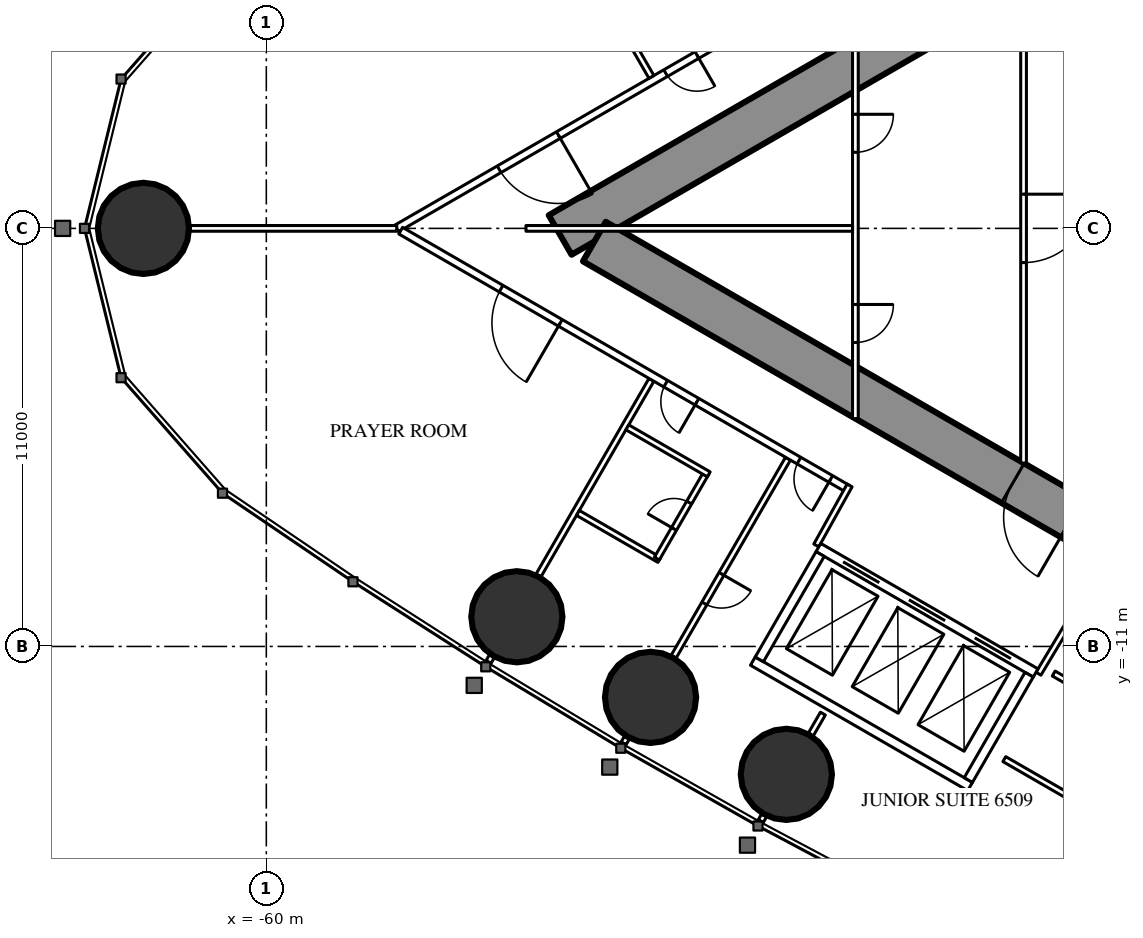
"""IFC4 building model, lengths in metres.
Left out: names, types, materials, properties, quantities, classifications, styles, units other than length and angle.
Written with IfcOpenShell. Run it as: python <this file> out.ifc"""

import sys

from ifc_helpers import new_model, si_unit, direction, frame, frame_2d, origin, origin_2d, place, context, subcontext, project, spatial, rectangle, circle, extrude, element, fill, save


model = new_model("IFC4")
c1 = context("Model", 3, precision=1e-05, world=origin(), true_north=direction((0.0, 1.0)))
c2 = subcontext(c1, "Body", "Model", "MODEL_VIEW")
j1 = project(units=[si_unit("LENGTHUNIT", "METRE"), si_unit("PLANEANGLEUNIT", "RADIAN")], contexts=[c1])
p1 = place(None, origin())
s1 = spatial("IfcSite", under=j1, at=p1, CompositionType="ELEMENT")
p2 = place(p1, origin())
s2 = spatial("IfcBuilding", under=s1, at=p2, CompositionType="ELEMENT")
p3 = place(p2, frame((0.0, 0.0, 244.1)))
s3 = spatial("IfcBuildingStorey", under=s2, at=p3, CompositionType="ELEMENT", Elevation=244.1)
for number, where, z_axis, x_axis in (
    (1, (-63.234, 0.0, 0.0), (0.0, 0.0, 1.0), (1.0, 0.0, 0.0)),
    (2, (-53.408, -10.219, 0.0), (0.0, 0.0, 1.0), (1.0, 0.0, 0.0)),
    (3, (-49.89, -12.34, 0.0), (0.0, 0.0, 1.0), (1.0, 0.0, 0.0)),
    (4, (-46.317, -14.365, 0.0), (0.0, 0.0, 1.0), (1.0, 0.0, 0.0)),
):
    element("IfcColumn", number, at=place(p3, frame(where, z_axis=z_axis, x_axis=x_axis)), inside=s3, PredefinedType="COLUMN", context=c2, shape_type="SweptSolid", body=[
        extrude(circle(Radius=1.2, at=origin_2d()), origin(), (0.0, 0.0, 1.0), 3.6),
    ])
p4 = place(p3, frame((-27.2, 14.3, 0.0), z_axis=(0.0, 0.0, 1.0), x_axis=(-0.866026593062, -0.499997940104, 0.0)))
e5 = element("IfcWall", 5, at=p4, inside=s3, PredefinedType="SHEAR", context=c2, shape_type="SweptSolid", body=[
    extrude(rectangle(XDim=28.946, YDim=1.2, at=frame_2d((14.473, 0.0))), origin(), (0.0, 0.0, 1.0), 3.6),
])
p5 = place(p4, frame((4.6, 0.0, 0.0)))
e6 = element("IfcOpeningElement", 6, at=p5, cuts=e5, PredefinedType="OPENING", context=c2, shape_type="SweptSolid", body=[
    extrude(rectangle(XDim=1.0, YDim=2.2, at=frame_2d((0.5, 1.1))), frame((0.0, 0.61, 0.0), z_axis=(0.0, -1.0, 0.0), x_axis=(1.0, 0.0, 0.0)), (0.0, 0.0, 1.0), 1.22),
])
p6 = place(p4, frame((13.395, 0.0, 0.0)))
e7 = element("IfcOpeningElement", 7, at=p6, cuts=e5, PredefinedType="OPENING", context=c2, shape_type="SweptSolid", body=[
    extrude(rectangle(XDim=1.8, YDim=2.2, at=frame_2d((0.9, 1.1))), frame((0.0, 0.61, 0.0), z_axis=(0.0, -1.0, 0.0), x_axis=(1.0, 0.0, 0.0)), (0.0, 0.0, 1.0), 1.22),
])
p7 = place(p3, frame((-27.2, -14.3, 0.0), z_axis=(0.0, 0.0, 1.0), x_axis=(-0.866024021859, 0.500002393557, 0.0)))
e8 = element("IfcWall", 8, at=p7, inside=s3, PredefinedType="SHEAR", context=c2, shape_type="SweptSolid", body=[
    extrude(rectangle(XDim=27.907, YDim=1.2, at=frame_2d((13.954, 0.0))), origin(), (0.0, 0.0, 1.0), 3.6),
])
p8 = place(p7, frame((4.6, 0.0, 0.0)))
e9 = element("IfcOpeningElement", 9, at=p8, cuts=e8, PredefinedType="OPENING", context=c2, shape_type="SweptSolid", body=[
    extrude(rectangle(XDim=1.0, YDim=2.2, at=frame_2d((0.5, 1.1))), frame((0.0, 0.61, 0.0), z_axis=(0.0, -1.0, 0.0), x_axis=(1.0, 0.0, 0.0)), (0.0, 0.0, 1.0), 1.22),
])
p9 = place(p7, frame((13.395, 0.0, 0.0)))
e10 = element("IfcOpeningElement", 10, at=p9, cuts=e8, PredefinedType="OPENING", context=c2, shape_type="SweptSolid", body=[
    extrude(rectangle(XDim=1.8, YDim=2.2, at=frame_2d((0.9, 1.1))), frame((0.0, 0.61, 0.0), z_axis=(0.0, -1.0, 0.0), x_axis=(1.0, 0.0, 0.0)), (0.0, 0.0, 1.0), 1.22),
])
p10 = place(p3, frame((-28.737, 16.068, 0.0), z_axis=(0.0, 0.0, 1.0), x_axis=(-0.866026057212, -0.499998868229, 0.0)))
e11 = element("IfcWall", 11, at=p10, inside=s3, PredefinedType="PARTITIONING", context=c2, shape_type="SweptSolid", body=[
    extrude(rectangle(XDim=32.137, YDim=0.2, at=frame_2d((16.068, 0.0))), origin(), (0.0, 0.0, 1.0), 3.35),
])
p11 = place(p10, frame((1.08, 0.0, 0.0)))
e12 = element("IfcOpeningElement", 12, at=p11, cuts=e11, PredefinedType="OPENING", context=c2, shape_type="SweptSolid", body=[
    extrude(rectangle(XDim=1.8, YDim=2.04, at=frame_2d((0.9, 1.02))), frame((0.0, 0.11, 0.0), z_axis=(0.0, -1.0, 0.0), x_axis=(1.0, 0.0, 0.0)), (0.0, 0.0, 1.0), 0.22),
])
p12 = place(p10, frame((6.86, 0.0, 0.0)))
e13 = element("IfcOpeningElement", 13, at=p12, cuts=e11, PredefinedType="OPENING", context=c2, shape_type="SweptSolid", body=[
    extrude(rectangle(XDim=1.0, YDim=2.2, at=frame_2d((0.5, 1.1))), frame((0.0, 0.11, 0.0), z_axis=(0.0, -1.0, 0.0), x_axis=(1.0, 0.0, 0.0)), (0.0, 0.0, 1.0), 0.22),
])
p13 = place(p10, frame((18.867, 0.0, 0.0)))
e14 = element("IfcOpeningElement", 14, at=p13, cuts=e11, PredefinedType="OPENING", context=c2, shape_type="SweptSolid", body=[
    extrude(rectangle(XDim=0.95, YDim=2.2, at=frame_2d((0.475, 1.1))), frame((0.0, 0.11, 0.0), z_axis=(0.0, -1.0, 0.0), x_axis=(1.0, 0.0, 0.0)), (0.0, 0.0, 1.0), 0.22),
])
p14 = place(p10, frame((23.015, 0.0, 0.0)))
e15 = element("IfcOpeningElement", 15, at=p14, cuts=e11, PredefinedType="OPENING", context=c2, shape_type="SweptSolid", body=[
    extrude(rectangle(XDim=0.95, YDim=2.2, at=frame_2d((0.475, 1.1))), frame((0.0, 0.11, 0.0), z_axis=(0.0, -1.0, 0.0), x_axis=(1.0, 0.0, 0.0)), (0.0, 0.0, 1.0), 0.22),
])
p15 = place(p10, frame((27.226, 0.0, 0.0)))
e16 = element("IfcOpeningElement", 16, at=p15, cuts=e11, PredefinedType="OPENING", context=c2, shape_type="SweptSolid", body=[
    extrude(rectangle(XDim=1.8, YDim=2.2, at=frame_2d((0.9, 1.1))), frame((0.0, 0.11, 0.0), z_axis=(0.0, -1.0, 0.0), x_axis=(1.0, 0.0, 0.0)), (0.0, 0.0, 1.0), 0.22),
])
p16 = place(p3, frame((-49.866, 3.985, 0.0), z_axis=(0.0, 0.0, 1.0), x_axis=(-0.500000694566, 0.866025002776, 0.0)))
e17 = element("IfcWall", 17, at=p16, inside=s3, PredefinedType="PARTITIONING", context=c2, shape_type="SweptSolid", body=[
    extrude(rectangle(XDim=5.95, YDim=0.15, at=frame_2d((2.975, 0.0))), origin(), (0.0, 0.0, 1.0), 2.45),
])
p17 = place(p3, frame((-46.898, -15.439, 0.0), z_axis=(0.0, 0.0, 1.0), x_axis=(-0.500232303069, -0.865891241997, 0.0)))
e18 = element("IfcWall", 18, at=p17, inside=s3, PredefinedType="PARTITIONING", context=c2, shape_type="SweptSolid", body=[
    extrude(rectangle(XDim=0.18, YDim=0.15, at=frame_2d((0.09, 0.0))), origin(), (0.0, 0.0, 1.0), 2.45),
])
p18 = place(p3, frame((-46.274, -6.059, 0.0), z_axis=(0.0, 0.0, 1.0), x_axis=(-0.500020471368, -0.866013584312, 0.0)))
e19 = element("IfcWall", 19, at=p18, inside=s3, PredefinedType="PARTITIONING", context=c2, shape_type="SweptSolid", body=[
    extrude(rectangle(XDim=6.028, YDim=0.15, at=frame_2d((3.014, 0.0))), origin(), (0.0, 0.0, 1.0), 2.45),
])
p19 = place(p18, frame((3.5, 0.0, 0.0)))
e20 = element("IfcOpeningElement", 20, at=p19, cuts=e19, PredefinedType="OPENING", context=c2, shape_type="SweptSolid", body=[
    extrude(rectangle(XDim=0.9, YDim=2.2, at=frame_2d((0.45, 1.1))), frame((0.0, 0.085, 0.0), z_axis=(0.0, -1.0, 0.0), x_axis=(1.0, 0.0, 0.0)), (0.0, 0.0, 1.0), 0.17),
])
p20 = place(p3, frame((-50.508, -13.392, 0.0), z_axis=(0.0, 0.0, 1.0), x_axis=(-0.499644091975, -0.866230789891, 0.0)))
e21 = element("IfcWall", 21, at=p20, inside=s3, PredefinedType="PARTITIONING", context=c2, shape_type="SweptSolid", body=[
    extrude(rectangle(XDim=0.18, YDim=0.15, at=frame_2d((0.09, 0.0))), origin(), (0.0, 0.0, 1.0), 2.45),
])
p21 = place(p3, frame((-49.866, -3.985, 0.0), z_axis=(0.0, 0.0, 1.0), x_axis=(-0.500000694566, -0.866025002776, 0.0)))
e22 = element("IfcWall", 22, at=p21, inside=s3, PredefinedType="PARTITIONING", context=c2, shape_type="SweptSolid", body=[
    extrude(rectangle(XDim=5.95, YDim=0.15, at=frame_2d((2.975, 0.0))), origin(), (0.0, 0.0, 1.0), 2.45),
])
p22 = place(p3, frame((-54.061, -11.25, 0.0), z_axis=(0.0, 0.0, 1.0), x_axis=(-0.500391173478, -0.865799441849, 0.0)))
e23 = element("IfcWall", 23, at=p22, inside=s3, PredefinedType="PARTITIONING", context=c2, shape_type="SweptSolid", body=[
    extrude(rectangle(XDim=0.179, YDim=0.15, at=frame_2d((0.089, 0.0))), origin(), (0.0, 0.0, 1.0), 2.45),
])
p23 = place(p3, frame((-56.568, 0.0, 0.0), z_axis=(0.0, 0.0, 1.0), x_axis=(-1.0, 0.0, 0.0)))
e24 = element("IfcWall", 24, at=p23, inside=s3, PredefinedType="PARTITIONING", context=c2, shape_type="SweptSolid", body=[
    extrude(rectangle(XDim=5.446, YDim=0.15, at=frame_2d((2.723, 0.0))), origin(), (0.0, 0.0, 1.0), 2.45),
])
p24 = place(p3, frame((-45.356, -12.767, 0.0), z_axis=(0.0, 0.0, 1.0), x_axis=(-0.499886366516, -0.866091000168, 0.0)))
e25 = element("IfcWall", 25, at=p24, inside=s3, PredefinedType="PARTITIONING", context=c2, shape_type="SweptSolid", body=[
    extrude(rectangle(XDim=0.645, YDim=0.15, at=frame_2d((0.322, 0.0))), origin(), (0.0, 0.0, 1.0), 3.35),
])
p25 = place(p3, frame((-44.715, -6.844, 0.0), z_axis=(0.0, 0.0, 1.0), x_axis=(-0.866025261224, 0.500000246922, 0.0)))
e26 = element("IfcWall", 26, at=p25, inside=s3, PredefinedType="PARTITIONING", context=c2, shape_type="SweptSolid", body=[
    extrude(rectangle(XDim=13.567, YDim=0.2, at=frame_2d((6.783, 0.0))), origin(), (0.0, 0.0, 1.0), 3.35),
])
p26 = place(p25, frame((8.716, 0.0, 0.0)))
e27 = element("IfcOpeningElement", 27, at=p26, cuts=e26, PredefinedType="OPENING", context=c2, shape_type="SweptSolid", body=[
    extrude(rectangle(XDim=1.8, YDim=2.2, at=frame_2d((0.9, 1.1))), frame((0.0, 0.11, 0.0), z_axis=(0.0, -1.0, 0.0), x_axis=(1.0, 0.0, 0.0)), (0.0, 0.0, 1.0), 0.22),
])
p27 = place(p25, frame((4.565, 0.0, 0.0)))
e28 = element("IfcOpeningElement", 28, at=p27, cuts=e26, PredefinedType="OPENING", context=c2, shape_type="SweptSolid", body=[
    extrude(rectangle(XDim=0.95, YDim=2.2, at=frame_2d((0.475, 1.1))), frame((0.0, 0.11, 0.0), z_axis=(0.0, -1.0, 0.0), x_axis=(1.0, 0.0, 0.0)), (0.0, 0.0, 1.0), 0.22),
])
p28 = place(p25, frame((0.5, 0.0, 0.0)))
e29 = element("IfcOpeningElement", 29, at=p28, cuts=e26, PredefinedType="OPENING", context=c2, shape_type="SweptSolid", body=[
    extrude(rectangle(XDim=0.967, YDim=2.2, at=frame_2d((0.483, 1.1))), frame((0.0, 0.11, 0.0), z_axis=(0.0, -1.0, 0.0), x_axis=(1.0, 0.0, 0.0)), (0.0, 0.0, 1.0), 0.22),
])
for number, where, z_axis, x_axis in (
    (30, (-39.683, -11.718, 0.0), (0.0, 0.0, 1.0), (0.514, 0.858, 0.0)),
    (31, (-44.652, -6.764, 0.0), (0.0, 0.0, 1.0), (-0.485, -0.874, 0.0)),
):
    element("IfcWall", number, at=place(p3, frame(where, z_axis=z_axis, x_axis=x_axis)), inside=s3, PredefinedType="PARTITIONING", context=c2, shape_type="SweptSolid", body=[
        extrude(rectangle(XDim=1.805, YDim=0.15, at=frame_2d((0.903, 0.0))), origin(), (0.0, 0.0, 1.0), 3.35),
    ])
p29 = place(p3, frame((-49.658, -8.724, 0.0), z_axis=(0.0, 0.0, 1.0), x_axis=(-0.866031185235, 0.4999899861, 0.0)))
e32 = element("IfcWall", 32, at=p29, inside=s3, PredefinedType="PARTITIONING", context=c2, shape_type="SweptSolid", body=[
    extrude(rectangle(XDim=2.475, YDim=0.15, at=frame_2d((1.238, 0.0))), origin(), (0.0, 0.0, 1.0), 3.35),
])
p30 = place(p3, frame((-48.423, -6.435, 0.0), z_axis=(0.0, 0.0, 1.0), x_axis=(-0.500006934395, -0.866021400173, 0.0)))
e33 = element("IfcWall", 33, at=p30, inside=s3, PredefinedType="PARTITIONING", context=c2, shape_type="SweptSolid", body=[
    extrude(rectangle(XDim=2.6, YDim=0.15, at=frame_2d((1.3, 0.0))), origin(), (0.0, 0.0, 1.0), 3.35),
])
p31 = place(p30, frame((0.9, 0.0, 0.0)))
e34 = element("IfcOpeningElement", 34, at=p31, cuts=e33, PredefinedType="OPENING", context=c2, shape_type="SweptSolid", body=[
    extrude(rectangle(XDim=0.8, YDim=2.2, at=frame_2d((0.4, 1.1))), frame((0.0, 0.085, 0.0), z_axis=(0.0, -1.0, 0.0), x_axis=(1.0, 0.0, 0.0)), (0.0, 0.0, 1.0), 0.17),
])
p32 = place(p3, frame((-48.358, -6.472, 0.0), z_axis=(0.0, 0.0, 1.0), x_axis=(-0.866073894602, 0.499916002032, 0.0)))
e35 = element("IfcWall", 35, at=p32, inside=s3, PredefinedType="PARTITIONING", context=c2, shape_type="SweptSolid", body=[
    extrude(rectangle(XDim=2.475, YDim=0.15, at=frame_2d((1.238, 0.0))), origin(), (0.0, 0.0, 1.0), 2.5),
])
p33 = place(p3, frame((-38.438, -15.202, 0.0), z_axis=(0.0, 0.0, 1.0), x_axis=(-0.866073894602, 0.499916002032, 0.0)))
e36 = element("IfcWall", 36, at=p33, inside=s3, PredefinedType="PARTITIONING", context=c2, shape_type="SweptSolid", body=[
    extrude(rectangle(XDim=2.475, YDim=0.15, at=frame_2d((1.238, 0.0))), origin(), (0.0, 0.0, 1.0), 3.35),
])
p34 = place(p3, frame((-37.138, -12.95, 0.0), z_axis=(0.0, 0.0, 1.0), x_axis=(-0.866031185235, 0.4999899861, 0.0)))
e37 = element("IfcWall", 37, at=p34, inside=s3, PredefinedType="PARTITIONING", context=c2, shape_type="SweptSolid", body=[
    extrude(rectangle(XDim=2.475, YDim=0.15, at=frame_2d((1.238, 0.0))), origin(), (0.0, 0.0, 1.0), 2.5),
])
p35 = place(p3, frame((-40.075, 6.174, 0.0), z_axis=(0.0, 0.0, 1.0), x_axis=(0.0, -1.0, 0.0)))
e38 = element("IfcWall", 38, at=p35, inside=s3, PredefinedType="PARTITIONING", context=c2, shape_type="SweptSolid", body=[
    extrude(rectangle(XDim=12.348, YDim=0.15, at=frame_2d((6.174, 0.0))), origin(), (0.0, 0.0, 1.0), 3.35),
])
p36 = place(p35, frame((5.274, 0.0, 0.0)))
e39 = element("IfcOpeningElement", 39, at=p36, cuts=e38, PredefinedType="OPENING", context=c2, shape_type="SweptSolid", body=[
    extrude(rectangle(XDim=1.8, YDim=2.2, at=frame_2d((0.9, 1.1))), frame((0.0, 0.085, 0.0), z_axis=(0.0, -1.0, 0.0), x_axis=(1.0, 0.0, 0.0)), (0.0, 0.0, 1.0), 0.17),
])
p37 = place(p3, frame((-44.5, 5.005, 0.0), z_axis=(0.0, 0.0, 1.0), x_axis=(0.0, -1.0, 0.0)))
e40 = element("IfcWall", 40, at=p37, inside=s3, PredefinedType="PARTITIONING", context=c2, shape_type="SweptSolid", body=[
    extrude(rectangle(XDim=10.009, YDim=0.15, at=frame_2d((5.005, 0.0))), origin(), (0.0, 0.0, 1.0), 2.5),
])
p38 = place(p37, frame((2.002, 0.0, 0.0)))
e41 = element("IfcOpeningElement", 41, at=p38, cuts=e40, PredefinedType="OPENING", context=c2, shape_type="SweptSolid", body=[
    extrude(rectangle(XDim=1.0, YDim=2.2, at=frame_2d((0.5, 1.1))), frame((0.0, 0.085, 0.0), z_axis=(0.0, -1.0, 0.0), x_axis=(1.0, 0.0, 0.0)), (0.0, 0.0, 1.0), 0.17),
])
p39 = place(p37, frame((7.007, 0.0, 0.0)))
e42 = element("IfcOpeningElement", 42, at=p39, cuts=e40, PredefinedType="OPENING", context=c2, shape_type="SweptSolid", body=[
    extrude(rectangle(XDim=1.0, YDim=2.2, at=frame_2d((0.5, 1.1))), frame((0.0, 0.085, 0.0), z_axis=(0.0, -1.0, 0.0), x_axis=(1.0, 0.0, 0.0)), (0.0, 0.0, 1.0), 0.17),
])
p40 = place(p3, frame((-44.575, 0.0, 0.0), z_axis=(0.0, 0.0, 1.0), x_axis=(-1.0, 0.0, 0.0)))
e43 = element("IfcWall", 43, at=p40, inside=s3, PredefinedType="PARTITIONING", context=c2, shape_type="SweptSolid", body=[
    extrude(rectangle(XDim=8.593, YDim=0.15, at=frame_2d((4.297, 0.0))), origin(), (0.0, 0.0, 1.0), 2.45),
])
p41 = place(p3, frame((-39.758, -11.697, 0.0), z_axis=(0.0, 0.0, 1.0), x_axis=(-0.866024194504, 0.500002094529, 0.0)))
e44 = element("IfcWall", 44, at=p41, inside=s3, PredefinedType="PARTITIONING", context=c2, shape_type="SweptSolid", body=[
    extrude(rectangle(XDim=6.6, YDim=0.25, at=frame_2d((3.3, 0.0))), origin(), (0.0, 0.0, 1.0), 3.35),
])
p42 = place(p41, frame((0.75, 0.0, 0.0)))
e45 = element("IfcOpeningElement", 45, at=p42, cuts=e44, PredefinedType="OPENING", context=c2, shape_type="SweptSolid", body=[
    extrude(rectangle(XDim=1.1, YDim=2.2, at=frame_2d((0.55, 1.1))), frame((0.0, 0.135, 0.0), z_axis=(0.0, -1.0, 0.0), x_axis=(1.0, 0.0, 0.0)), (0.0, 0.0, 1.0), 0.27),
])
p43 = place(p41, frame((2.75, 0.0, 0.0)))
e46 = element("IfcOpeningElement", 46, at=p43, cuts=e44, PredefinedType="OPENING", context=c2, shape_type="SweptSolid", body=[
    extrude(rectangle(XDim=1.1, YDim=2.2, at=frame_2d((0.55, 1.1))), frame((0.0, 0.135, 0.0), z_axis=(0.0, -1.0, 0.0), x_axis=(1.0, 0.0, 0.0)), (0.0, 0.0, 1.0), 0.27),
])
p44 = place(p41, frame((4.75, 0.0, 0.0)))
e47 = element("IfcOpeningElement", 47, at=p44, cuts=e44, PredefinedType="OPENING", context=c2, shape_type="SweptSolid", body=[
    extrude(rectangle(XDim=1.1, YDim=2.2, at=frame_2d((0.55, 1.1))), frame((0.0, 0.135, 0.0), z_axis=(0.0, -1.0, 0.0), x_axis=(1.0, 0.0, 0.0)), (0.0, 0.0, 1.0), 0.27),
])
p45 = place(p3, frame((-41.482, -14.686, 0.0), z_axis=(0.0, 0.0, 1.0), x_axis=(-0.86603344179, 0.499986077507, 0.0)))
e48 = element("IfcWall", 48, at=p45, inside=s3, PredefinedType="PARTITIONING", context=c2, shape_type="SweptSolid", body=[
    extrude(rectangle(XDim=6.6, YDim=0.25, at=frame_2d((3.3, 0.0))), origin(), (0.0, 0.0, 1.0), 3.35),
])
for number, where, z_axis, x_axis in (
    (49, (-39.928, -11.743, 0.0), (0.0, 0.0, 1.0), (-0.5, -0.866, 0.0)),
    (50, (-45.428, -8.568, 0.0), (0.0, 0.0, 1.0), (-0.5, -0.866, 0.0)),
):
    element("IfcWall", number, at=place(p3, frame(where, z_axis=z_axis, x_axis=x_axis)), inside=s3, PredefinedType="PARTITIONING", context=c2, shape_type="SweptSolid", body=[
        extrude(rectangle(XDim=3.201, YDim=0.25, at=frame_2d((1.6, 0.0))), origin(), (0.0, 0.0, 1.0), 3.35),
    ])
p46 = place(p14, origin())
e51 = element("IfcDoor", 51, at=p46, inside=s3, OperationType="SINGLE_SWING_LEFT", PredefinedType="DOOR", context=c2, shape_type="SweptSolid", body=[
    extrude(rectangle(XDim=0.95, YDim=2.2, at=frame_2d((0.475, 1.1))), frame((0.0, 0.025, 0.0), z_axis=(0.0, -1.0, 0.0), x_axis=(1.0, 0.0, 0.0)), (0.0, 0.0, 1.0), 0.05),
])
fill(e15, e51)
p47 = place(p15, origin())
e52 = element("IfcDoor", 52, at=p47, inside=s3, OperationType="DOUBLE_DOOR_SINGLE_SWING", PredefinedType="DOOR", context=c2, shape_type="SweptSolid", body=[
    extrude(rectangle(XDim=1.8, YDim=2.2, at=frame_2d((0.9, 1.1))), frame((0.0, 0.025, 0.0), z_axis=(0.0, -1.0, 0.0), x_axis=(1.0, 0.0, 0.0)), (0.0, 0.0, 1.0), 0.05),
])
fill(e16, e52)
p48 = place(p26, origin())
e53 = element("IfcDoor", 53, at=p48, inside=s3, OperationType="DOUBLE_DOOR_SINGLE_SWING", PredefinedType="DOOR", context=c2, shape_type="SweptSolid", body=[
    extrude(rectangle(XDim=1.8, YDim=2.2, at=frame_2d((0.9, 1.1))), frame((0.0, 0.025, 0.0), z_axis=(0.0, -1.0, 0.0), x_axis=(1.0, 0.0, 0.0)), (0.0, 0.0, 1.0), 0.05),
])
fill(e27, e53)
p49 = place(p31, origin())
e54 = element("IfcDoor", 54, at=p49, inside=s3, OperationType="SINGLE_SWING_RIGHT", PredefinedType="DOOR", context=c2, shape_type="SweptSolid", body=[
    extrude(rectangle(XDim=0.8, YDim=2.2, at=frame_2d((0.4, 1.1))), frame((0.0, 0.025, 0.0), z_axis=(0.0, -1.0, 0.0), x_axis=(1.0, 0.0, 0.0)), (0.0, 0.0, 1.0), 0.05),
])
fill(e34, e54)
p50 = place(p27, origin())
e55 = element("IfcDoor", 55, at=p50, inside=s3, OperationType="SINGLE_SWING_LEFT", PredefinedType="DOOR", context=c2, shape_type="SweptSolid", body=[
    extrude(rectangle(XDim=0.95, YDim=2.2, at=frame_2d((0.475, 1.1))), frame((0.0, 0.025, 0.0), z_axis=(0.0, -1.0, 0.0), x_axis=(1.0, 0.0, 0.0)), (0.0, 0.0, 1.0), 0.05),
])
fill(e28, e55)
p51 = place(p28, origin())
e56 = element("IfcDoor", 56, at=p51, inside=s3, OperationType="SINGLE_SWING_LEFT", PredefinedType="DOOR", context=c2, shape_type="SweptSolid", body=[
    extrude(rectangle(XDim=0.967, YDim=2.2, at=frame_2d((0.483, 1.1))), frame((0.0, 0.025, 0.0), z_axis=(0.0, -1.0, 0.0), x_axis=(1.0, 0.0, 0.0)), (0.0, 0.0, 1.0), 0.05),
])
fill(e29, e56)
p52 = place(p19, origin())
e57 = element("IfcDoor", 57, at=p52, inside=s3, OperationType="SINGLE_SWING_LEFT", PredefinedType="DOOR", context=c2, shape_type="SweptSolid", body=[
    extrude(rectangle(XDim=0.9, YDim=2.2, at=frame_2d((0.45, 1.1))), frame((0.0, 0.025, 0.0), z_axis=(0.0, -1.0, 0.0), x_axis=(1.0, 0.0, 0.0)), (0.0, 0.0, 1.0), 0.05),
])
fill(e20, e57)
p53 = place(p36, origin())
e58 = element("IfcDoor", 58, at=p53, inside=s3, OperationType="DOUBLE_DOOR_SINGLE_SWING", PredefinedType="DOOR", context=c2, shape_type="SweptSolid", body=[
    extrude(rectangle(XDim=1.8, YDim=2.2, at=frame_2d((0.9, 1.1))), frame((0.0, 0.025, 0.0), z_axis=(0.0, -1.0, 0.0), x_axis=(1.0, 0.0, 0.0)), (0.0, 0.0, 1.0), 0.05),
])
fill(e39, e58)
p54 = place(p38, origin())
e59 = element("IfcDoor", 59, at=p54, inside=s3, OperationType="SINGLE_SWING_LEFT", PredefinedType="DOOR", context=c2, shape_type="SweptSolid", body=[
    extrude(rectangle(XDim=1.0, YDim=2.2, at=frame_2d((0.5, 1.1))), frame((0.0, 0.025, 0.0), z_axis=(0.0, -1.0, 0.0), x_axis=(1.0, 0.0, 0.0)), (0.0, 0.0, 1.0), 0.05),
])
fill(e41, e59)
p55 = place(p39, origin())
e60 = element("IfcDoor", 60, at=p55, inside=s3, OperationType="SINGLE_SWING_LEFT", PredefinedType="DOOR", context=c2, shape_type="SweptSolid", body=[
    extrude(rectangle(XDim=1.0, YDim=2.2, at=frame_2d((0.5, 1.1))), frame((0.0, 0.025, 0.0), z_axis=(0.0, -1.0, 0.0), x_axis=(1.0, 0.0, 0.0)), (0.0, 0.0, 1.0), 0.05),
])
fill(e42, e60)
p56 = place(p9, origin())
e61 = element("IfcDoor", 61, at=p56, inside=s3, OperationType="DOUBLE_DOOR_SINGLE_SWING", PredefinedType="DOOR", context=c2, shape_type="SweptSolid", body=[
    extrude(rectangle(XDim=1.8, YDim=2.2, at=frame_2d((0.9, 1.1))), frame((0.0, 0.025, 0.0), z_axis=(0.0, -1.0, 0.0), x_axis=(1.0, 0.0, 0.0)), (0.0, 0.0, 1.0), 0.05),
])
fill(e10, e61)
p57 = place(p42, origin())
e62 = element("IfcDoor", 62, at=p57, inside=s3, OperationType="DOUBLE_DOOR_SLIDING", PredefinedType="USERDEFINED", context=c2, shape_type="SweptSolid", body=[
    extrude(rectangle(XDim=1.1, YDim=2.2, at=frame_2d((0.55, 1.1))), frame((0.0, 0.025, 0.0), z_axis=(0.0, -1.0, 0.0), x_axis=(1.0, 0.0, 0.0)), (0.0, 0.0, 1.0), 0.05),
])
fill(e45, e62)
p58 = place(p43, origin())
e63 = element("IfcDoor", 63, at=p58, inside=s3, OperationType="DOUBLE_DOOR_SLIDING", PredefinedType="USERDEFINED", context=c2, shape_type="SweptSolid", body=[
    extrude(rectangle(XDim=1.1, YDim=2.2, at=frame_2d((0.55, 1.1))), frame((0.0, 0.025, 0.0), z_axis=(0.0, -1.0, 0.0), x_axis=(1.0, 0.0, 0.0)), (0.0, 0.0, 1.0), 0.05),
])
fill(e46, e63)
p59 = place(p44, origin())
e64 = element("IfcDoor", 64, at=p59, inside=s3, OperationType="DOUBLE_DOOR_SLIDING", PredefinedType="USERDEFINED", context=c2, shape_type="SweptSolid", body=[
    extrude(rectangle(XDim=1.1, YDim=2.2, at=frame_2d((0.55, 1.1))), frame((0.0, 0.025, 0.0), z_axis=(0.0, -1.0, 0.0), x_axis=(1.0, 0.0, 0.0)), (0.0, 0.0, 1.0), 0.05),
])
fill(e47, e64)
save(model, sys.argv[1])
